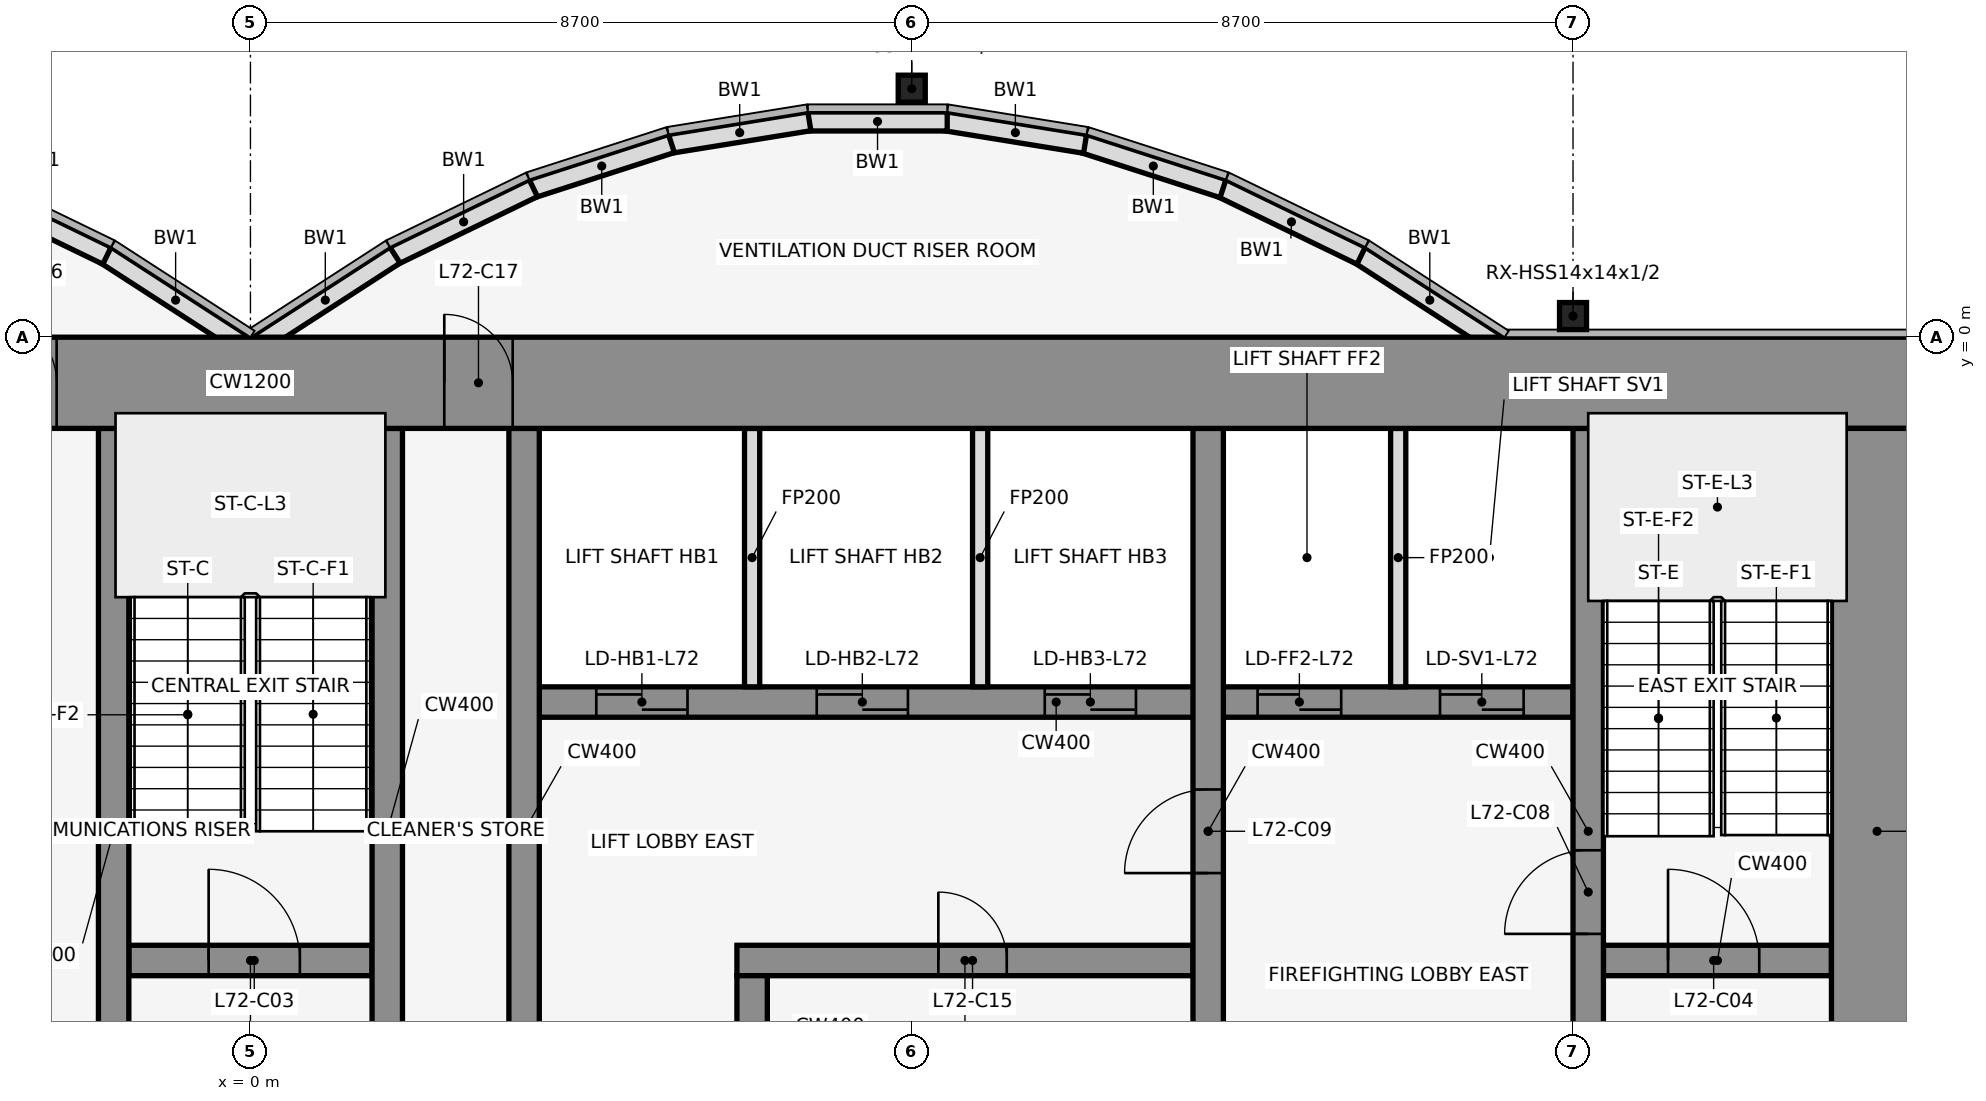
"""IFC4 building model, lengths in metres.
Left out: names, types, materials, properties, quantities, classifications, styles, units other than length and angle.
Written with IfcOpenShell. Run it as: python <this file> out.ifc"""

import sys

from ifc_helpers import new_model, si_unit, direction, frame, frame_2d, origin, origin_2d, place, context, subcontext, project, spatial, rectangle, hollow_rectangle, extrude, element, fill, save


model = new_model("IFC4")
c1 = context("Model", 3, precision=1e-05, world=origin(), true_north=direction((0.0, 1.0)))
c2 = subcontext(c1, "Body", "Model", "MODEL_VIEW")
j1 = project(units=[si_unit("LENGTHUNIT", "METRE"), si_unit("PLANEANGLEUNIT", "RADIAN")], contexts=[c1])
p1 = place(None, origin())
s1 = spatial("IfcSite", under=j1, at=p1, CompositionType="ELEMENT")
p2 = place(p1, origin())
s2 = spatial("IfcBuilding", under=s1, at=p2, CompositionType="ELEMENT")
p3 = place(p2, frame((0.0, 0.0, 320.0)))
s3 = spatial("IfcBuildingStorey", under=s2, at=p3, CompositionType="ELEMENT", Elevation=320.0)
for number, where, z_axis, x_axis in (
    (1, (8.7, 3.269, 0.0), (0.0, 0.0, 1.0), (1.0, 0.0, 0.0)),
    (2, (17.4, 0.278, 0.0), (0.0, 0.0, 1.0), (1.0, 0.0, 0.0)),
):
    element("IfcColumn", number, at=place(p3, frame(where, z_axis=z_axis, x_axis=x_axis)), inside=s3, PredefinedType="COLUMN", context=c2, shape_type="SweptSolid", body=[
        extrude(hollow_rectangle(XDim=0.356, YDim=0.356, WallThickness=0.012, at=origin_2d()), origin(), (0.0, 0.0, 1.0), 4.5),
    ])
p4 = place(p3, frame((16.432, -0.105, 0.0), z_axis=(0.0, 0.0, 1.0), x_axis=(-0.83981312244, 0.542875602121, 0.0)))
e3 = element("IfcWall", 3, at=p4, inside=s3, PredefinedType="STANDARD", context=c2, shape_type="SweptSolid", body=[
    extrude(rectangle(XDim=2.183, YDim=0.25, at=frame_2d((1.091, 0.0))), origin(), (0.0, 0.0, 1.0), 4.35),
])
p5 = place(p3, frame((14.612, 1.073, 0.0), z_axis=(0.0, 0.0, 1.0), x_axis=(-0.89982408427, 0.436252928206, 0.0)))
e4 = element("IfcWall", 4, at=p5, inside=s3, PredefinedType="STANDARD", context=c2, shape_type="SweptSolid", body=[
    extrude(rectangle(XDim=2.038, YDim=0.25, at=frame_2d((1.019, 0.0))), origin(), (0.0, 0.0, 1.0), 4.35),
])
p6 = place(p3, frame((12.795, 1.955, 0.0), z_axis=(0.0, 0.0, 1.0), x_axis=(-0.951495806175, 0.307661714928, 0.0)))
e5 = element("IfcWall", 5, at=p6, inside=s3, PredefinedType="STANDARD", context=c2, shape_type="SweptSolid", body=[
    extrude(rectangle(XDim=1.927, YDim=0.25, at=frame_2d((0.963, 0.0))), origin(), (0.0, 0.0, 1.0), 4.35),
])
p7 = place(p3, frame((10.98, 2.543, 0.0), z_axis=(0.0, 0.0, 1.0), x_axis=(-0.987181718931, 0.159600293885, 0.0)))
e6 = element("IfcWall", 6, at=p7, inside=s3, PredefinedType="STANDARD", context=c2, shape_type="SweptSolid", body=[
    extrude(rectangle(XDim=1.857, YDim=0.25, at=frame_2d((0.929, 0.0))), origin(), (0.0, 0.0, 1.0), 4.35),
])
p8 = place(p3, frame((9.167, 2.838, 0.0), z_axis=(0.0, 0.0, 1.0), x_axis=(-1.0, 0.0, 0.0)))
e7 = element("IfcWall", 7, at=p8, inside=s3, PredefinedType="STANDARD", context=c2, shape_type="SweptSolid", body=[
    extrude(rectangle(XDim=1.833, YDim=0.25, at=frame_2d((0.917, 0.0))), origin(), (0.0, 0.0, 1.0), 4.35),
])
p9 = place(p3, frame((7.353, 2.84, 0.0), z_axis=(0.0, 0.0, 1.0), x_axis=(-0.987181718931, -0.159600293885, 0.0)))
e8 = element("IfcWall", 8, at=p9, inside=s3, PredefinedType="STANDARD", context=c2, shape_type="SweptSolid", body=[
    extrude(rectangle(XDim=1.857, YDim=0.25, at=frame_2d((0.929, 0.0))), origin(), (0.0, 0.0, 1.0), 4.35),
])
p10 = place(p3, frame((5.538, 2.548, 0.0), z_axis=(0.0, 0.0, 1.0), x_axis=(-0.951495806175, -0.307661714928, 0.0)))
e9 = element("IfcWall", 9, at=p10, inside=s3, PredefinedType="STANDARD", context=c2, shape_type="SweptSolid", body=[
    extrude(rectangle(XDim=1.927, YDim=0.25, at=frame_2d((0.963, 0.0))), origin(), (0.0, 0.0, 1.0), 4.35),
])
p11 = place(p3, frame((3.721, 1.962, 0.0), z_axis=(0.0, 0.0, 1.0), x_axis=(-0.89982408427, -0.436252928206, 0.0)))
e10 = element("IfcWall", 10, at=p11, inside=s3, PredefinedType="STANDARD", context=c2, shape_type="SweptSolid", body=[
    extrude(rectangle(XDim=2.038, YDim=0.25, at=frame_2d((1.019, 0.0))), origin(), (0.0, 0.0, 1.0), 4.35),
])
for number, where, z_axis, x_axis in (
    (11, (1.901, 1.08, 0.0), (0.0, 0.0, 1.0), (-0.84, -0.543, 0.0)),
    (12, (-0.068, -0.105, 0.0), (0.0, 0.0, 1.0), (-0.84, 0.543, 0.0)),
):
    element("IfcWall", number, at=place(p3, frame(where, z_axis=z_axis, x_axis=x_axis)), inside=s3, PredefinedType="STANDARD", context=c2, shape_type="SweptSolid", body=[
        extrude(rectangle(XDim=2.183, YDim=0.25, at=frame_2d((1.091, 0.0))), origin(), (0.0, 0.0, 1.0), 4.35),
    ])
p12 = place(p3, frame((-1.888, 1.073, 0.0), z_axis=(0.0, 0.0, 1.0), x_axis=(-0.89982408427, 0.436252928206, 0.0)))
e13 = element("IfcWall", 13, at=p12, inside=s3, PredefinedType="STANDARD", context=c2, shape_type="SweptSolid", body=[
    extrude(rectangle(XDim=2.038, YDim=0.25, at=frame_2d((1.019, 0.0))), origin(), (0.0, 0.0, 1.0), 4.35),
])
p13 = place(p3, frame((-1.6, -8.2, 0.0), z_axis=(0.0, 0.0, 1.0), x_axis=(1.0, 0.0, 0.0)))
e14 = element("IfcWall", 14, at=p13, inside=s3, PredefinedType="SHEAR", context=c2, shape_type="SweptSolid", body=[
    extrude(rectangle(XDim=3.2, YDim=0.4, at=frame_2d((1.6, 0.0))), origin(), (0.0, 0.0, 1.0), 4.5),
])
p14 = place(p13, frame((1.05, 0.0, 0.0)))
e15 = element("IfcOpeningElement", 15, at=p14, cuts=e14, PredefinedType="OPENING", context=c2, shape_type="SweptSolid", body=[
    extrude(rectangle(XDim=1.2, YDim=2.1, at=frame_2d((0.6, 1.05))), frame((0.0, 0.212, 0.0), z_axis=(0.0, -1.0, 0.0), x_axis=(1.0, 0.0, 0.0)), (0.0, 0.0, 1.0), 0.424),
])
p15 = place(p3, frame((6.4, -8.2, 0.0), z_axis=(0.0, 0.0, 1.0), x_axis=(1.0, 0.0, 0.0)))
e16 = element("IfcWall", 16, at=p15, inside=s3, PredefinedType="SHEAR", context=c2, shape_type="SweptSolid", body=[
    extrude(rectangle(XDim=6.0, YDim=0.4, at=frame_2d((3.0, 0.0))), origin(), (0.0, 0.0, 1.0), 4.5),
])
p16 = place(p15, frame((2.65, 0.0, 0.0)))
e17 = element("IfcOpeningElement", 17, at=p16, cuts=e16, PredefinedType="OPENING", context=c2, shape_type="SweptSolid", body=[
    extrude(rectangle(XDim=0.9, YDim=2.1, at=frame_2d((0.45, 1.05))), frame((0.0, 0.212, 0.0), z_axis=(0.0, -1.0, 0.0), x_axis=(1.0, 0.0, 0.0)), (0.0, 0.0, 1.0), 0.424),
])
p17 = place(p3, frame((17.8, -8.2, 0.0), z_axis=(0.0, 0.0, 1.0), x_axis=(1.0, 0.0, 0.0)))
e18 = element("IfcWall", 18, at=p17, inside=s3, PredefinedType="SHEAR", context=c2, shape_type="SweptSolid", body=[
    extrude(rectangle(XDim=3.0, YDim=0.4, at=frame_2d((1.5, 0.0))), origin(), (0.0, 0.0, 1.0), 4.5),
])
p18 = place(p17, frame((0.85, 0.0, 0.0)))
e19 = element("IfcOpeningElement", 19, at=p18, cuts=e18, PredefinedType="OPENING", context=c2, shape_type="SweptSolid", body=[
    extrude(rectangle(XDim=1.2, YDim=2.1, at=frame_2d((0.6, 1.05))), frame((0.0, 0.212, 0.0), z_axis=(0.0, -1.0, 0.0), x_axis=(1.0, 0.0, 0.0)), (0.0, 0.0, 1.0), 0.424),
])
p19 = place(p3, frame((3.8, -4.8, 0.0), z_axis=(0.0, 0.0, 1.0), x_axis=(1.0, 0.0, 0.0)))
e20 = element("IfcWall", 20, at=p19, inside=s3, PredefinedType="SHEAR", context=c2, shape_type="SweptSolid", body=[
    extrude(rectangle(XDim=13.6, YDim=0.4, at=frame_2d((6.8, 0.0))), origin(), (0.0, 0.0, 1.0), 4.5),
])
p20 = place(p19, frame((0.75, 0.0, 0.0)))
e21 = element("IfcOpeningElement", 21, at=p20, cuts=e20, PredefinedType="OPENING", context=c2, shape_type="SweptSolid", body=[
    extrude(rectangle(XDim=1.2, YDim=2.1, at=frame_2d((0.6, 1.05))), frame((0.0, 0.212, 0.0), z_axis=(0.0, -1.0, 0.0), x_axis=(1.0, 0.0, 0.0)), (0.0, 0.0, 1.0), 0.424),
])
p21 = place(p19, frame((3.65, 0.0, 0.0)))
e22 = element("IfcOpeningElement", 22, at=p21, cuts=e20, PredefinedType="OPENING", context=c2, shape_type="SweptSolid", body=[
    extrude(rectangle(XDim=1.2, YDim=2.1, at=frame_2d((0.6, 1.05))), frame((0.0, 0.212, 0.0), z_axis=(0.0, -1.0, 0.0), x_axis=(1.0, 0.0, 0.0)), (0.0, 0.0, 1.0), 0.424),
])
p22 = place(p19, frame((6.65, 0.0, 0.0)))
e23 = element("IfcOpeningElement", 23, at=p22, cuts=e20, PredefinedType="OPENING", context=c2, shape_type="SweptSolid", body=[
    extrude(rectangle(XDim=1.2, YDim=2.1, at=frame_2d((0.6, 1.05))), frame((0.0, 0.212, 0.0), z_axis=(0.0, -1.0, 0.0), x_axis=(1.0, 0.0, 0.0)), (0.0, 0.0, 1.0), 0.424),
])
p23 = place(p19, frame((9.45, 0.0, 0.0)))
e24 = element("IfcOpeningElement", 24, at=p23, cuts=e20, PredefinedType="OPENING", context=c2, shape_type="SweptSolid", body=[
    extrude(rectangle(XDim=1.1, YDim=2.1, at=frame_2d((0.55, 1.05))), frame((0.0, 0.212, 0.0), z_axis=(0.0, -1.0, 0.0), x_axis=(1.0, 0.0, 0.0)), (0.0, 0.0, 1.0), 0.424),
])
p24 = place(p19, frame((11.85, 0.0, 0.0)))
e25 = element("IfcOpeningElement", 25, at=p24, cuts=e20, PredefinedType="OPENING", context=c2, shape_type="SweptSolid", body=[
    extrude(rectangle(XDim=1.1, YDim=2.1, at=frame_2d((0.55, 1.05))), frame((0.0, 0.212, 0.0), z_axis=(0.0, -1.0, 0.0), x_axis=(1.0, 0.0, 0.0)), (0.0, 0.0, 1.0), 0.424),
])
for number, where, z_axis, x_axis in (
    (26, (-1.8, -11.8, 0.0), (0.0, 0.0, 1.0), (0.0, 1.0, 0.0)),
    (27, (1.8, -11.8, 0.0), (0.0, 0.0, 1.0), (0.0, 1.0, 0.0)),
):
    element("IfcWall", number, at=place(p3, frame(where, z_axis=z_axis, x_axis=x_axis)), inside=s3, PredefinedType="SHEAR", context=c2, shape_type="SweptSolid", body=[
        extrude(rectangle(XDim=10.6, YDim=0.4, at=frame_2d((5.3, 0.0))), origin(), (0.0, 0.0, 1.0), 4.5),
    ])
p25 = place(p3, frame((3.6, -11.8, 0.0), z_axis=(0.0, 0.0, 1.0), x_axis=(0.0, 1.0, 0.0)))
e28 = element("IfcWall", 28, at=p25, inside=s3, PredefinedType="SHEAR", context=c2, shape_type="SweptSolid", body=[
    extrude(rectangle(XDim=10.6, YDim=0.4, at=frame_2d((5.3, 0.0))), origin(), (0.0, 0.0, 1.0), 4.5),
])
p26 = place(p25, frame((1.35, 0.0, 0.0)))
e29 = element("IfcOpeningElement", 29, at=p26, cuts=e28, PredefinedType="OPENING", context=c2, shape_type="SweptSolid", body=[
    extrude(rectangle(XDim=0.9, YDim=2.1, at=frame_2d((0.45, 1.05))), frame((0.0, 0.212, 0.0), z_axis=(0.0, -1.0, 0.0), x_axis=(1.0, 0.0, 0.0)), (0.0, 0.0, 1.0), 0.424),
])
p27 = place(p3, frame((6.6, -11.8, 0.0), z_axis=(0.0, 0.0, 1.0), x_axis=(0.0, 1.0, 0.0)))
e30 = element("IfcWall", 30, at=p27, inside=s3, PredefinedType="SHEAR", context=c2, shape_type="SweptSolid", body=[
    extrude(rectangle(XDim=3.4, YDim=0.4, at=frame_2d((1.7, 0.0))), origin(), (0.0, 0.0, 1.0), 4.5),
])
for number, where, z_axis, x_axis in (
    (31, (6.6, -4.6, 0.0), (0.0, 0.0, 1.0), (0.0, 1.0, 0.0)),
    (32, (9.6, -4.6, 0.0), (0.0, 0.0, 1.0), (0.0, 1.0, 0.0)),
):
    element("IfcWall", number, at=place(p3, frame(where, z_axis=z_axis, x_axis=x_axis)), inside=s3, PredefinedType="PARTITIONING", context=c2, shape_type="SweptSolid", body=[
        extrude(rectangle(XDim=3.4, YDim=0.2, at=frame_2d((1.7, 0.0))), origin(), (0.0, 0.0, 1.0), 3.418),
    ])
p28 = place(p3, frame((12.6, -11.8, 0.0), z_axis=(0.0, 0.0, 1.0), x_axis=(0.0, 1.0, 0.0)))
e33 = element("IfcWall", 33, at=p28, inside=s3, PredefinedType="SHEAR", context=c2, shape_type="SweptSolid", body=[
    extrude(rectangle(XDim=10.6, YDim=0.4, at=frame_2d((5.3, 0.0))), origin(), (0.0, 0.0, 1.0), 4.5),
])
p29 = place(p28, frame((4.75, 0.0, 0.0)))
e34 = element("IfcOpeningElement", 34, at=p29, cuts=e33, PredefinedType="OPENING", context=c2, shape_type="SweptSolid", body=[
    extrude(rectangle(XDim=1.1, YDim=2.1, at=frame_2d((0.55, 1.05))), frame((0.0, 0.212, 0.0), z_axis=(0.0, -1.0, 0.0), x_axis=(1.0, 0.0, 0.0)), (0.0, 0.0, 1.0), 0.424),
])
p30 = place(p3, frame((15.1, -4.6, 0.0), z_axis=(0.0, 0.0, 1.0), x_axis=(0.0, 1.0, 0.0)))
e35 = element("IfcWall", 35, at=p30, inside=s3, PredefinedType="PARTITIONING", context=c2, shape_type="SweptSolid", body=[
    extrude(rectangle(XDim=3.4, YDim=0.2, at=frame_2d((1.7, 0.0))), origin(), (0.0, 0.0, 1.0), 3.418),
])
p31 = place(p3, frame((17.6, -11.8, 0.0), z_axis=(0.0, 0.0, 1.0), x_axis=(0.0, 1.0, 0.0)))
e36 = element("IfcWall", 36, at=p31, inside=s3, PredefinedType="SHEAR", context=c2, shape_type="SweptSolid", body=[
    extrude(rectangle(XDim=10.6, YDim=0.4, at=frame_2d((5.3, 0.0))), origin(), (0.0, 0.0, 1.0), 4.5),
])
p32 = place(p31, frame((1.25, 0.0, 0.0)))
e37 = element("IfcOpeningElement", 37, at=p32, cuts=e36, PredefinedType="OPENING", context=c2, shape_type="SweptSolid", body=[
    extrude(rectangle(XDim=1.1, YDim=2.1, at=frame_2d((0.55, 1.05))), frame((0.0, 0.212, 0.0), z_axis=(0.0, -1.0, 0.0), x_axis=(1.0, 0.0, 0.0)), (0.0, 0.0, 1.0), 0.424),
])
p33 = place(p31, frame((3.95, 0.0, 0.0)))
e38 = element("IfcOpeningElement", 38, at=p33, cuts=e36, PredefinedType="OPENING", context=c2, shape_type="SweptSolid", body=[
    extrude(rectangle(XDim=1.1, YDim=2.1, at=frame_2d((0.55, 1.05))), frame((0.0, 0.212, 0.0), z_axis=(0.0, -1.0, 0.0), x_axis=(1.0, 0.0, 0.0)), (0.0, 0.0, 1.0), 0.424),
])
p34 = place(p3, frame((-22.0, -0.6, 0.0), z_axis=(0.0, 0.0, 1.0), x_axis=(1.0, 0.0, 0.0)))
e39 = element("IfcWall", 39, at=p34, inside=s3, PredefinedType="SHEAR", context=c2, shape_type="SweptSolid", body=[
    extrude(rectangle(XDim=44.0, YDim=1.2, at=frame_2d((22.0, 0.0))), origin(), (0.0, 0.0, 1.0), 4.5),
])
p35 = place(p34, frame((18.55, 0.0, 0.0)))
e40 = element("IfcOpeningElement", 40, at=p35, cuts=e39, PredefinedType="OPENING", context=c2, shape_type="SweptSolid", body=[
    extrude(rectangle(XDim=0.9, YDim=2.1, at=frame_2d((0.45, 1.05))), frame((0.0, 0.612, 0.0), z_axis=(0.0, -1.0, 0.0), x_axis=(1.0, 0.0, 0.0)), (0.0, 0.0, 1.0), 1.224),
])
p36 = place(p34, frame((24.55, 0.0, 0.0)))
e41 = element("IfcOpeningElement", 41, at=p36, cuts=e39, PredefinedType="OPENING", context=c2, shape_type="SweptSolid", body=[
    extrude(rectangle(XDim=0.9, YDim=2.1, at=frame_2d((0.45, 1.05))), frame((0.0, 0.612, 0.0), z_axis=(0.0, -1.0, 0.0), x_axis=(1.0, 0.0, 0.0)), (0.0, 0.0, 1.0), 1.224),
])
p37 = place(p3, frame((21.4, -11.8, 0.0), z_axis=(0.0, 0.0, 1.0), x_axis=(0.0, 1.0, 0.0)))
e42 = element("IfcWall", 42, at=p37, inside=s3, PredefinedType="SHEAR", context=c2, shape_type="SweptSolid", body=[
    extrude(rectangle(XDim=10.6, YDim=1.2, at=frame_2d((5.3, 0.0))), origin(), (0.0, 0.0, 1.0), 4.5),
])
p38 = place(p14, origin())
e43 = element("IfcDoor", 43, at=p38, inside=s3, OperationType="SINGLE_SWING_LEFT", PredefinedType="DOOR", context=c2, shape_type="SweptSolid", body=[
    extrude(rectangle(XDim=1.2, YDim=2.1, at=frame_2d((0.6, 1.05))), frame((0.0, 0.025, 0.0), z_axis=(0.0, -1.0, 0.0), x_axis=(1.0, 0.0, 0.0)), (0.0, 0.0, 1.0), 0.05),
])
fill(e15, e43)
p39 = place(p18, origin())
e44 = element("IfcDoor", 44, at=p39, inside=s3, OperationType="SINGLE_SWING_RIGHT", PredefinedType="DOOR", context=c2, shape_type="SweptSolid", body=[
    extrude(rectangle(XDim=1.2, YDim=2.1, at=frame_2d((0.6, 1.05))), frame((0.0, 0.025, 0.0), z_axis=(0.0, -1.0, 0.0), x_axis=(1.0, 0.0, 0.0)), (0.0, 0.0, 1.0), 0.05),
])
fill(e19, e44)
p40 = place(p20, origin())
e45 = element("IfcDoor", 45, at=p40, inside=s3, OperationType="DOUBLE_DOOR_SLIDING", PredefinedType="DOOR", context=c2, shape_type="SweptSolid", body=[
    extrude(rectangle(XDim=1.2, YDim=2.1, at=frame_2d((0.6, 1.05))), frame((0.0, 0.025, 0.0), z_axis=(0.0, -1.0, 0.0), x_axis=(1.0, 0.0, 0.0)), (0.0, 0.0, 1.0), 0.05),
])
fill(e21, e45)
p41 = place(p21, origin())
e46 = element("IfcDoor", 46, at=p41, inside=s3, OperationType="DOUBLE_DOOR_SLIDING", PredefinedType="DOOR", context=c2, shape_type="SweptSolid", body=[
    extrude(rectangle(XDim=1.2, YDim=2.1, at=frame_2d((0.6, 1.05))), frame((0.0, 0.025, 0.0), z_axis=(0.0, -1.0, 0.0), x_axis=(1.0, 0.0, 0.0)), (0.0, 0.0, 1.0), 0.05),
])
fill(e22, e46)
p42 = place(p22, origin())
e47 = element("IfcDoor", 47, at=p42, inside=s3, OperationType="DOUBLE_DOOR_SLIDING", PredefinedType="DOOR", context=c2, shape_type="SweptSolid", body=[
    extrude(rectangle(XDim=1.2, YDim=2.1, at=frame_2d((0.6, 1.05))), frame((0.0, 0.025, 0.0), z_axis=(0.0, -1.0, 0.0), x_axis=(1.0, 0.0, 0.0)), (0.0, 0.0, 1.0), 0.05),
])
fill(e23, e47)
p43 = place(p23, origin())
e48 = element("IfcDoor", 48, at=p43, inside=s3, OperationType="DOUBLE_DOOR_SLIDING", PredefinedType="DOOR", context=c2, shape_type="SweptSolid", body=[
    extrude(rectangle(XDim=1.1, YDim=2.1, at=frame_2d((0.55, 1.05))), frame((0.0, 0.025, 0.0), z_axis=(0.0, -1.0, 0.0), x_axis=(1.0, 0.0, 0.0)), (0.0, 0.0, 1.0), 0.05),
])
fill(e24, e48)
p44 = place(p24, origin())
e49 = element("IfcDoor", 49, at=p44, inside=s3, OperationType="DOUBLE_DOOR_SLIDING", PredefinedType="DOOR", context=c2, shape_type="SweptSolid", body=[
    extrude(rectangle(XDim=1.1, YDim=2.1, at=frame_2d((0.55, 1.05))), frame((0.0, 0.025, 0.0), z_axis=(0.0, -1.0, 0.0), x_axis=(1.0, 0.0, 0.0)), (0.0, 0.0, 1.0), 0.05),
])
fill(e25, e49)
p45 = place(p33, origin())
e50 = element("IfcDoor", 50, at=p45, inside=s3, OperationType="SINGLE_SWING_RIGHT", PredefinedType="DOOR", context=c2, shape_type="SweptSolid", body=[
    extrude(rectangle(XDim=1.1, YDim=2.1, at=frame_2d((0.55, 1.05))), frame((0.0, 0.025, 0.0), z_axis=(0.0, -1.0, 0.0), x_axis=(1.0, 0.0, 0.0)), (0.0, 0.0, 1.0), 0.05),
])
fill(e38, e50)
p46 = place(p29, frame((1.1, 0.0, 0.0), z_axis=(0.0, 0.0, 1.0), x_axis=(-1.0, 0.0, 0.0)))
e51 = element("IfcDoor", 51, at=p46, inside=s3, OperationType="SINGLE_SWING_RIGHT", PredefinedType="DOOR", context=c2, shape_type="SweptSolid", body=[
    extrude(rectangle(XDim=1.1, YDim=2.1, at=frame_2d((0.55, 1.05))), frame((0.0, 0.025, 0.0), z_axis=(0.0, -1.0, 0.0), x_axis=(1.0, 0.0, 0.0)), (0.0, 0.0, 1.0), 0.05),
])
fill(e34, e51)
p47 = place(p16, frame((0.9, 0.0, 0.0), z_axis=(0.0, 0.0, 1.0), x_axis=(-1.0, 0.0, 0.0)))
e52 = element("IfcDoor", 52, at=p47, inside=s3, OperationType="SINGLE_SWING_RIGHT", PredefinedType="DOOR", context=c2, shape_type="SweptSolid", body=[
    extrude(rectangle(XDim=0.9, YDim=2.1, at=frame_2d((0.45, 1.05))), frame((0.0, 0.025, 0.0), z_axis=(0.0, -1.0, 0.0), x_axis=(1.0, 0.0, 0.0)), (0.0, 0.0, 1.0), 0.05),
])
fill(e17, e52)
p48 = place(p35, origin())
e53 = element("IfcDoor", 53, at=p48, inside=s3, OperationType="SINGLE_SWING_LEFT", PredefinedType="DOOR", context=c2, shape_type="SweptSolid", body=[
    extrude(rectangle(XDim=0.9, YDim=2.1, at=frame_2d((0.45, 1.05))), frame((0.0, 0.025, 0.0), z_axis=(0.0, -1.0, 0.0), x_axis=(1.0, 0.0, 0.0)), (0.0, 0.0, 1.0), 0.05),
])
fill(e40, e53)
p49 = place(p36, origin())
e54 = element("IfcDoor", 54, at=p49, inside=s3, OperationType="SINGLE_SWING_LEFT", PredefinedType="DOOR", context=c2, shape_type="SweptSolid", body=[
    extrude(rectangle(XDim=0.9, YDim=2.1, at=frame_2d((0.45, 1.05))), frame((0.0, 0.025, 0.0), z_axis=(0.0, -1.0, 0.0), x_axis=(1.0, 0.0, 0.0)), (0.0, 0.0, 1.0), 0.05),
])
fill(e41, e54)
save(model, sys.argv[1])
